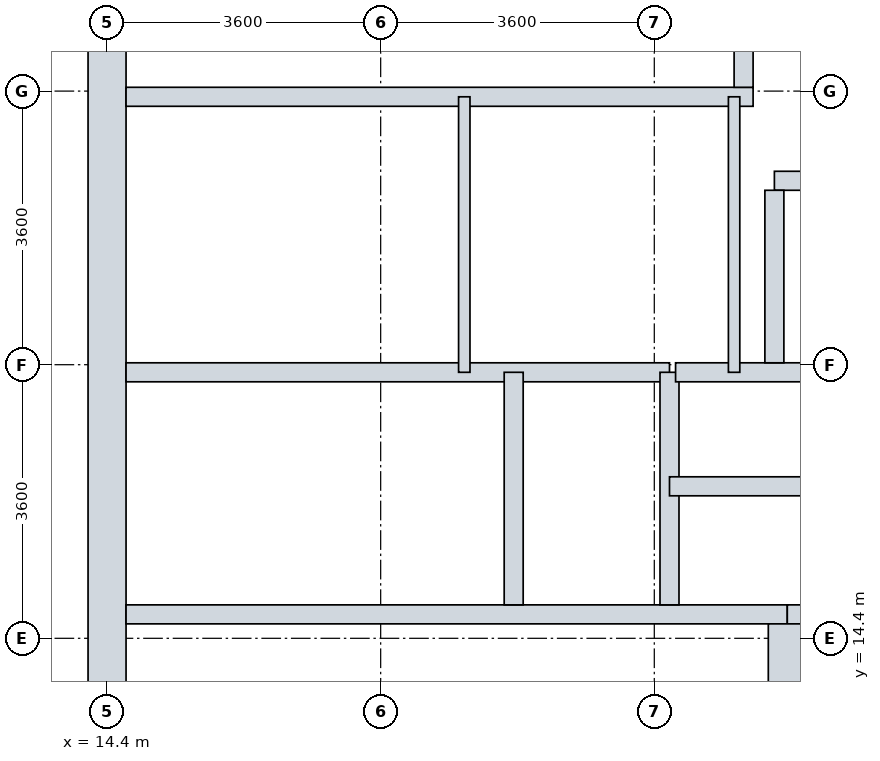
"""IFC4 building model, lengths in metres.
Left out: names, types, materials, properties, quantities, classifications, styles, units other than length and angle.
Written with IfcOpenShell. Run it as: python <this file> out.ifc"""

import sys

from ifc_helpers import new_model, si_unit, direction, frame, frame_2d, origin, place, context, subcontext, project, spatial, rectangle, extrude, element, fill, save


model = new_model("IFC4")
c1 = context("Model", 3, precision=1e-05, world=origin(), true_north=direction((0.0, 1.0)))
c2 = subcontext(c1, "Body", "Model", "MODEL_VIEW")
j1 = project(units=[si_unit("LENGTHUNIT", "METRE"), si_unit("PLANEANGLEUNIT", "RADIAN")], contexts=[c1])
p1 = place(None, origin())
s1 = spatial("IfcSite", under=j1, at=p1, CompositionType="ELEMENT")
p2 = place(p1, origin())
s2 = spatial("IfcBuilding", under=s1, at=p2, CompositionType="ELEMENT")
p3 = place(p2, frame((0.0, 0.0, 209.0)))
s3 = spatial("IfcBuildingStorey", under=s2, at=p3, CompositionType="ELEMENT", Elevation=209.0)
p4 = place(p3, frame((14.4, 10.8, 0.0), z_axis=(0.0, 0.0, 1.0), x_axis=(0.0, 1.0, 0.0)))
e1 = element("IfcWall", 1, at=p4, inside=s3, PredefinedType="SHEAR", context=c2, shape_type="SweptSolid", body=[
    extrude(rectangle(XDim=14.4, YDim=0.5, at=frame_2d((7.2, 0.0))), origin(), (0.0, 0.0, 1.0), 4.55),
])
p5 = place(p4, frame((11.05, 0.0, 0.0)))
e2 = element("IfcOpeningElement", 2, at=p5, cuts=e1, PredefinedType="OPENING", context=c2, shape_type="SweptSolid", body=[
    extrude(rectangle(XDim=1.1, YDim=2.1, at=frame_2d((0.55, 1.05))), frame((0.0, 0.26, 0.0), z_axis=(0.0, -1.0, 0.0), x_axis=(1.0, 0.0, 0.0)), (0.0, 0.0, 1.0), 0.52),
])
p6 = place(p4, frame((4.9, 0.0, 0.0)))
e3 = element("IfcOpeningElement", 3, at=p6, cuts=e1, PredefinedType="OPENING", context=c2, shape_type="SweptSolid", body=[
    extrude(rectangle(XDim=1.2, YDim=2.1, at=frame_2d((0.6, 1.05))), frame((0.0, 0.26, 0.0), z_axis=(0.0, -1.0, 0.0), x_axis=(1.0, 0.0, 0.0)), (0.0, 0.0, 1.0), 0.52),
])
p7 = place(p4, frame((8.15, 0.0, 0.0)))
e4 = element("IfcOpeningElement", 4, at=p7, cuts=e1, PredefinedType="OPENING", context=c2, shape_type="SweptSolid", body=[
    extrude(rectangle(XDim=0.9, YDim=2.1, at=frame_2d((0.45, 1.05))), frame((0.0, 0.26, 0.0), z_axis=(0.0, -1.0, 0.0), x_axis=(1.0, 0.0, 0.0)), (0.0, 0.0, 1.0), 0.52),
])
p8 = place(p3, frame((14.65, 14.715, 0.0), z_axis=(0.0, 0.0, 1.0), x_axis=(1.0, 0.0, 0.0)))
e5 = element("IfcWall", 5, at=p8, inside=s3, PredefinedType="SHEAR", context=c2, shape_type="SweptSolid", body=[
    extrude(rectangle(XDim=8.7, YDim=0.25, at=frame_2d((4.35, 0.0))), origin(), (0.0, 0.0, 1.0), 4.55),
])
p9 = place(p8, frame((0.705, 0.0, 0.0)))
e6 = element("IfcOpeningElement", 6, at=p9, cuts=e5, PredefinedType="OPENING", context=c2, shape_type="SweptSolid", body=[
    extrude(rectangle(XDim=1.1, YDim=2.1, at=frame_2d((0.55, 1.05))), frame((0.0, 0.135, 0.0), z_axis=(0.0, -1.0, 0.0), x_axis=(1.0, 0.0, 0.0)), (0.0, 0.0, 1.0), 0.27),
])
p10 = place(p3, frame((23.35, 14.715, 0.0), z_axis=(0.0, 0.0, 1.0), x_axis=(1.0, 0.0, 0.0)))
e7 = element("IfcWall", 7, at=p10, inside=s3, PredefinedType="SHEAR", context=c2, shape_type="SweptSolid", body=[
    extrude(rectangle(XDim=8.8, YDim=0.25, at=frame_2d((4.4, 0.0))), origin(), (0.0, 0.0, 1.0), 4.55),
])
p11 = place(p10, frame((6.775, 0.0, 0.0)))
e8 = element("IfcOpeningElement", 8, at=p11, cuts=e7, PredefinedType="OPENING", context=c2, shape_type="SweptSolid", body=[
    extrude(rectangle(XDim=1.1, YDim=2.1, at=frame_2d((0.55, 1.05))), frame((0.0, 0.135, 0.0), z_axis=(0.0, -1.0, 0.0), x_axis=(1.0, 0.0, 0.0)), (0.0, 0.0, 1.0), 0.27),
])
p12 = place(p3, frame((23.35, 11.75, 0.0), z_axis=(0.0, 0.0, 1.0), x_axis=(0.0, 1.0, 0.0)))
e9 = element("IfcWall", 9, at=p12, inside=s3, PredefinedType="SHEAR", context=c2, shape_type="SweptSolid", body=[
    extrude(rectangle(XDim=2.84, YDim=0.5, at=frame_2d((1.42, 0.0))), origin(), (0.0, 0.0, 1.0), 4.55),
])
p13 = place(p3, frame((14.65, 21.525, 0.0), z_axis=(0.0, 0.0, 1.0), x_axis=(1.0, 0.0, 0.0)))
e10 = element("IfcWall", 10, at=p13, inside=s3, PredefinedType="SHEAR", context=c2, shape_type="SweptSolid", body=[
    extrude(rectangle(XDim=8.25, YDim=0.25, at=frame_2d((4.125, 0.0))), origin(), (0.0, 0.0, 1.0), 4.55),
])
p14 = place(p3, frame((22.775, 21.65, 0.0), z_axis=(0.0, 0.0, 1.0), x_axis=(0.0, 1.0, 0.0)))
e11 = element("IfcWall", 11, at=p14, inside=s3, PredefinedType="SHEAR", context=c2, shape_type="SweptSolid", body=[
    extrude(rectangle(XDim=2.84, YDim=0.25, at=frame_2d((1.42, 0.0))), origin(), (0.0, 0.0, 1.0), 4.55),
])
p15 = place(p3, frame((14.65, 17.9, 0.0), z_axis=(0.0, 0.0, 1.0), x_axis=(1.0, 0.0, 0.0)))
e12 = element("IfcWall", 12, at=p15, inside=s3, PredefinedType="PARTITIONING", context=c2, shape_type="SweptSolid", body=[
    extrude(rectangle(XDim=7.15, YDim=0.25, at=frame_2d((3.575, 0.0))), origin(), (0.0, 0.0, 1.0), 4.535),
])
p16 = place(p3, frame((19.75, 14.84, 0.0), z_axis=(0.0, 0.0, 1.0), x_axis=(0.0, 1.0, 0.0)))
e13 = element("IfcWall", 13, at=p16, inside=s3, PredefinedType="PARTITIONING", context=c2, shape_type="SweptSolid", body=[
    extrude(rectangle(XDim=3.06, YDim=0.25, at=frame_2d((1.53, 0.0))), origin(), (0.0, 0.0, 1.0), 4.535),
])
p17 = place(p16, frame((0.98, 0.0, 0.0)))
e14 = element("IfcOpeningElement", 14, at=p17, cuts=e13, PredefinedType="OPENING", context=c2, shape_type="SweptSolid", body=[
    extrude(rectangle(XDim=1.1, YDim=2.1, at=frame_2d((0.55, 1.05))), frame((0.0, 0.135, 0.0), z_axis=(0.0, -1.0, 0.0), x_axis=(1.0, 0.0, 0.0)), (0.0, 0.0, 1.0), 0.27),
])
p18 = place(p3, frame((21.8, 14.84, 0.0), z_axis=(0.0, 0.0, 1.0), x_axis=(0.0, 1.0, 0.0)))
e15 = element("IfcWall", 15, at=p18, inside=s3, PredefinedType="PARTITIONING", context=c2, shape_type="SweptSolid", body=[
    extrude(rectangle(XDim=3.06, YDim=0.25, at=frame_2d((1.53, 0.0))), origin(), (0.0, 0.0, 1.0), 4.535),
])
p19 = place(p3, frame((21.88, 17.9, 0.0), z_axis=(0.0, 0.0, 1.0), x_axis=(1.0, 0.0, 0.0)))
e16 = element("IfcWall", 16, at=p19, inside=s3, PredefinedType="PARTITIONING", context=c2, shape_type="SweptSolid", body=[
    extrude(rectangle(XDim=8.52, YDim=0.25, at=frame_2d((4.26, 0.0))), origin(), (0.0, 0.0, 1.0), 4.535),
])
p20 = place(p3, frame((21.8, 16.4, 0.0), z_axis=(0.0, 0.0, 1.0), x_axis=(1.0, 0.0, 0.0)))
e17 = element("IfcWall", 17, at=p20, inside=s3, PredefinedType="PARTITIONING", context=c2, shape_type="SweptSolid", body=[
    extrude(rectangle(XDim=3.35, YDim=0.25, at=frame_2d((1.675, 0.0))), origin(), (0.0, 0.0, 1.0), 4.535),
])
p21 = place(p3, frame((23.18, 20.42, 0.0), z_axis=(0.0, 0.0, 1.0), x_axis=(1.0, 0.0, 0.0)))
e18 = element("IfcWall", 18, at=p21, inside=s3, PredefinedType="PARTITIONING", context=c2, shape_type="SweptSolid", body=[
    extrude(rectangle(XDim=7.22, YDim=0.25, at=frame_2d((3.61, 0.0))), origin(), (0.0, 0.0, 1.0), 4.535),
])
p22 = place(p21, frame((0.41, 0.0, 0.0)))
e19 = element("IfcOpeningElement", 19, at=p22, cuts=e18, PredefinedType="OPENING", context=c2, shape_type="SweptSolid", body=[
    extrude(rectangle(XDim=1.1, YDim=2.1, at=frame_2d((0.55, 1.05))), frame((0.0, 0.135, 0.0), z_axis=(0.0, -1.0, 0.0), x_axis=(1.0, 0.0, 0.0)), (0.0, 0.0, 1.0), 0.27),
])
p23 = place(p21, frame((2.19, 0.0, 0.0)))
e20 = element("IfcOpeningElement", 20, at=p23, cuts=e18, PredefinedType="OPENING", context=c2, shape_type="SweptSolid", body=[
    extrude(rectangle(XDim=1.1, YDim=2.1, at=frame_2d((0.55, 1.05))), frame((0.0, 0.135, 0.0), z_axis=(0.0, -1.0, 0.0), x_axis=(1.0, 0.0, 0.0)), (0.0, 0.0, 1.0), 0.27),
])
p24 = place(p21, frame((3.97, 0.0, 0.0)))
e21 = element("IfcOpeningElement", 21, at=p24, cuts=e18, PredefinedType="OPENING", context=c2, shape_type="SweptSolid", body=[
    extrude(rectangle(XDim=1.1, YDim=2.1, at=frame_2d((0.55, 1.05))), frame((0.0, 0.135, 0.0), z_axis=(0.0, -1.0, 0.0), x_axis=(1.0, 0.0, 0.0)), (0.0, 0.0, 1.0), 0.27),
])
p25 = place(p21, frame((5.75, 0.0, 0.0)))
e22 = element("IfcOpeningElement", 22, at=p25, cuts=e18, PredefinedType="OPENING", context=c2, shape_type="SweptSolid", body=[
    extrude(rectangle(XDim=1.1, YDim=2.1, at=frame_2d((0.55, 1.05))), frame((0.0, 0.135, 0.0), z_axis=(0.0, -1.0, 0.0), x_axis=(1.0, 0.0, 0.0)), (0.0, 0.0, 1.0), 0.27),
])
p26 = place(p3, frame((23.18, 18.025, 0.0), z_axis=(0.0, 0.0, 1.0), x_axis=(0.0, 1.0, 0.0)))
e23 = element("IfcWall", 23, at=p26, inside=s3, PredefinedType="PARTITIONING", context=c2, shape_type="SweptSolid", body=[
    extrude(rectangle(XDim=2.27, YDim=0.25, at=frame_2d((1.135, 0.0))), origin(), (0.0, 0.0, 1.0), 4.535),
])
p27 = place(p3, frame((22.65, 17.9, 0.0), z_axis=(0.0, 0.0, 1.0), x_axis=(0.0, 1.0, 0.0)))
e24 = element("IfcWall", 24, at=p27, inside=s3, PredefinedType="PARTITIONING", context=c2, shape_type="SweptSolid", body=[
    extrude(rectangle(XDim=3.625, YDim=0.15, at=frame_2d((1.812, 0.0))), origin(), (0.0, 0.0, 1.0), 4.535),
])
p28 = place(p27, frame((2.1, 0.0, 0.0)))
e25 = element("IfcOpeningElement", 25, at=p28, cuts=e24, PredefinedType="OPENING", context=c2, shape_type="SweptSolid", body=[
    extrude(rectangle(XDim=0.9, YDim=2.1, at=frame_2d((0.45, 1.05))), frame((0.0, 0.085, 0.0), z_axis=(0.0, -1.0, 0.0), x_axis=(1.0, 0.0, 0.0)), (0.0, 0.0, 1.0), 0.17),
])
p29 = place(p3, frame((19.1, 17.9, 0.0), z_axis=(0.0, 0.0, 1.0), x_axis=(0.0, 1.0, 0.0)))
e26 = element("IfcWall", 26, at=p29, inside=s3, PredefinedType="PARTITIONING", context=c2, shape_type="SweptSolid", body=[
    extrude(rectangle(XDim=3.625, YDim=0.15, at=frame_2d((1.812, 0.0))), origin(), (0.0, 0.0, 1.0), 4.535),
])
p30 = place(p9, origin())
e27 = element("IfcDoor", 27, at=p30, inside=s3, OperationType="SINGLE_SWING_LEFT", PredefinedType="DOOR", context=c2, shape_type="SweptSolid", body=[
    extrude(rectangle(XDim=1.1, YDim=2.1, at=frame_2d((0.55, 1.05))), frame((0.0, 0.025, 0.0), z_axis=(0.0, -1.0, 0.0), x_axis=(1.0, 0.0, 0.0)), (0.0, 0.0, 1.0), 0.05),
])
fill(e6, e27)
p31 = place(p5, origin())
e28 = element("IfcDoor", 28, at=p31, inside=s3, OperationType="SINGLE_SWING_RIGHT", PredefinedType="DOOR", context=c2, shape_type="SweptSolid", body=[
    extrude(rectangle(XDim=1.1, YDim=2.1, at=frame_2d((0.55, 1.05))), frame((0.0, 0.025, 0.0), z_axis=(0.0, -1.0, 0.0), x_axis=(1.0, 0.0, 0.0)), (0.0, 0.0, 1.0), 0.05),
])
fill(e2, e28)
p32 = place(p17, origin())
e29 = element("IfcDoor", 29, at=p32, inside=s3, OperationType="SLIDING_TO_LEFT", PredefinedType="DOOR", context=c2, shape_type="SweptSolid", body=[
    extrude(rectangle(XDim=1.1, YDim=2.1, at=frame_2d((0.55, 1.05))), frame((0.0, 0.025, 0.0), z_axis=(0.0, -1.0, 0.0), x_axis=(1.0, 0.0, 0.0)), (0.0, 0.0, 1.0), 0.05),
])
fill(e14, e29)
p33 = place(p6, origin())
e30 = element("IfcDoor", 30, at=p33, inside=s3, OperationType="SINGLE_SWING_RIGHT", PredefinedType="DOOR", context=c2, shape_type="SweptSolid", body=[
    extrude(rectangle(XDim=1.2, YDim=2.1, at=frame_2d((0.6, 1.05))), frame((0.0, 0.025, 0.0), z_axis=(0.0, -1.0, 0.0), x_axis=(1.0, 0.0, 0.0)), (0.0, 0.0, 1.0), 0.05),
])
fill(e3, e30)
p34 = place(p7, origin())
e31 = element("IfcDoor", 31, at=p34, inside=s3, OperationType="SINGLE_SWING_RIGHT", PredefinedType="DOOR", context=c2, shape_type="SweptSolid", body=[
    extrude(rectangle(XDim=0.9, YDim=2.1, at=frame_2d((0.45, 1.05))), frame((0.0, 0.025, 0.0), z_axis=(0.0, -1.0, 0.0), x_axis=(1.0, 0.0, 0.0)), (0.0, 0.0, 1.0), 0.05),
])
fill(e4, e31)
p35 = place(p28, origin())
e32 = element("IfcDoor", 32, at=p35, inside=s3, OperationType="SINGLE_SWING_LEFT", PredefinedType="DOOR", context=c2, shape_type="SweptSolid", body=[
    extrude(rectangle(XDim=0.9, YDim=2.1, at=frame_2d((0.45, 1.05))), frame((0.0, 0.025, 0.0), z_axis=(0.0, -1.0, 0.0), x_axis=(1.0, 0.0, 0.0)), (0.0, 0.0, 1.0), 0.05),
])
fill(e25, e32)
save(model, sys.argv[1])
